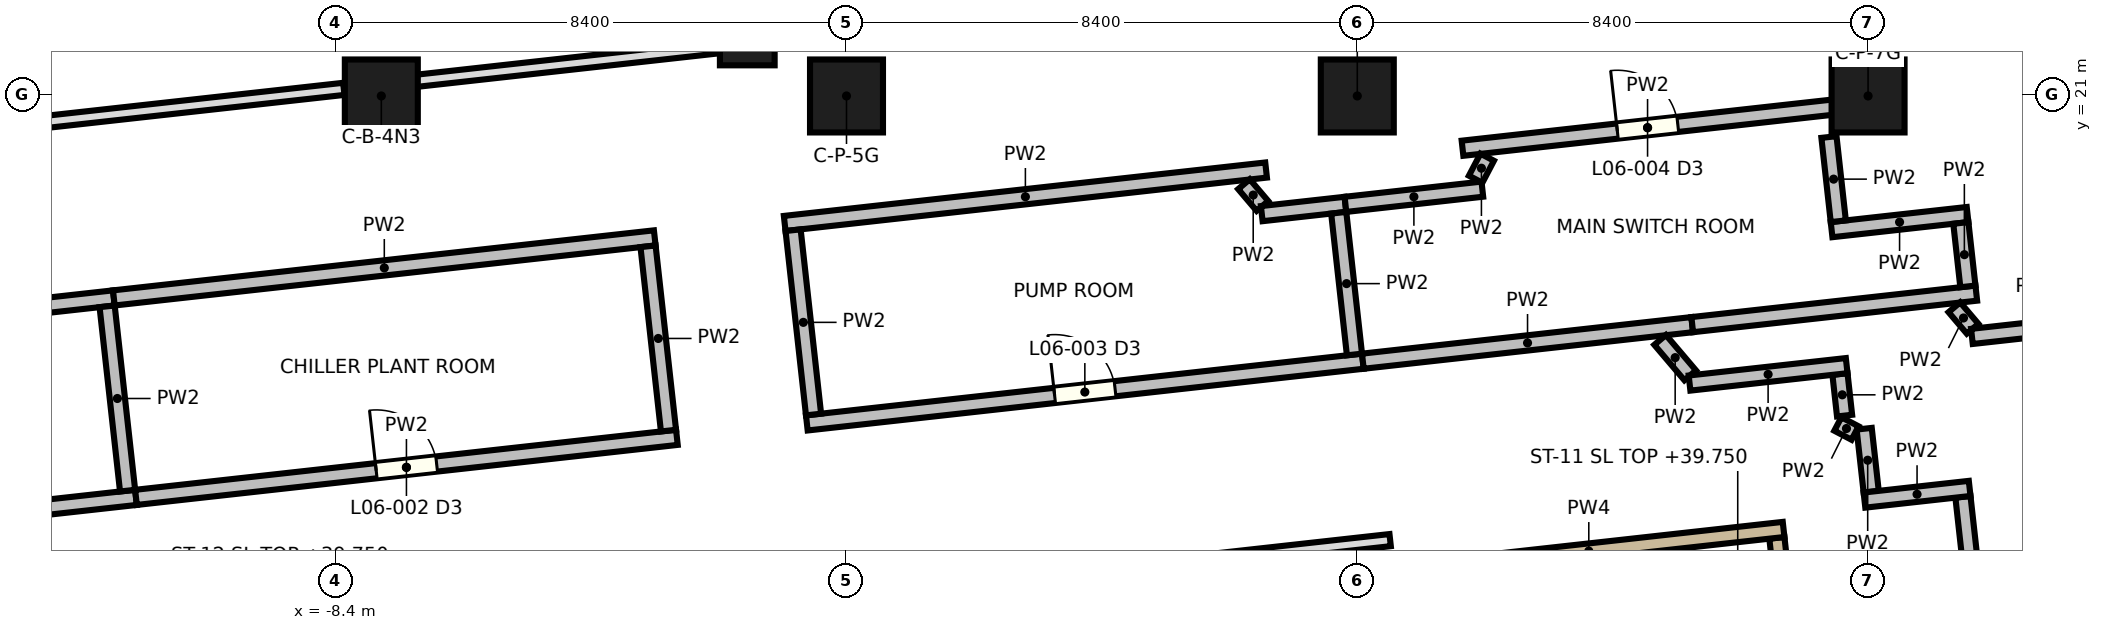
"""IFC4 building model, lengths in metres.
Left out: names, types, materials, properties, quantities, classifications, styles, units other than length and angle.
Written with IfcOpenShell. Run it as: python <this file> out.ifc"""

import sys

from ifc_helpers import new_model, si_unit, direction, frame, frame_2d, origin, origin_2d, place, context, subcontext, project, spatial, rectangle, extrude, element, fill, save


model = new_model("IFC4")
c1 = context("Model", 3, precision=1e-05, world=origin(), true_north=direction((0.0, 1.0)))
c2 = subcontext(c1, "Body", "Model", "MODEL_VIEW")
j1 = project(units=[si_unit("LENGTHUNIT", "METRE"), si_unit("PLANEANGLEUNIT", "RADIAN")], contexts=[c1])
p1 = place(None, origin())
s1 = spatial("IfcSite", under=j1, at=p1, CompositionType="ELEMENT")
p2 = place(p1, origin())
s2 = spatial("IfcBuilding", under=s1, at=p2, CompositionType="ELEMENT")
p3 = place(p2, frame((0.0, 0.0, 37.0)))
s3 = spatial("IfcBuildingStorey", under=s2, at=p3, CompositionType="ELEMENT", Elevation=37.0)
p4 = place(p3, frame((-1.632, 21.954, 0.0), z_axis=(0.0, 0.0, 1.0), x_axis=(1.0, 0.0, 0.0)))
e1 = element("IfcColumn", 1, at=p4, inside=s3, PredefinedType="COLUMN", context=c2, shape_type="SweptSolid", body=[
    extrude(rectangle(XDim=0.9, YDim=0.9, at=origin_2d()), origin(), (0.0, 0.0, 1.0), 4.3),
])
for number, where, z_axis, x_axis in (
    (2, (-7.65, 21.0, 0.0), (0.0, 0.0, 1.0), (1.0, 0.0, 0.0)),
    (3, (0.0, 21.0, 0.0), (0.0, 0.0, 1.0), (1.0, 0.0, 0.0)),
    (4, (8.4, 21.0, 0.0), (0.0, 0.0, 1.0), (1.0, 0.0, 0.0)),
    (5, (16.8, 21.0, 0.0), (0.0, 0.0, 1.0), (1.0, 0.0, 0.0)),
):
    element("IfcColumn", number, at=place(p3, frame(where, z_axis=z_axis, x_axis=x_axis)), inside=s3, PredefinedType="COLUMN", context=c2, shape_type="SweptSolid", body=[
        extrude(rectangle(XDim=1.2, YDim=1.2, at=origin_2d()), origin(), (0.0, 0.0, 1.0), 4.3),
    ])
p5 = place(p3, frame((-9.666, 11.631, 0.0), z_axis=(0.0, 0.0, 1.0), x_axis=(0.993896292658, 0.110318445605, 0.0)))
e6 = element("IfcWall", 6, at=p5, inside=s3, PredefinedType="PARTITIONING", context=c2, shape_type="SweptSolid", body=[
    extrude(rectangle(XDim=18.72, YDim=0.2, at=frame_2d((9.36, 0.0))), origin(), (0.0, 0.0, 1.0), 4.3),
])
p6 = place(p3, frame((-15.32, 13.995, 0.0), z_axis=(0.0, 0.0, 1.0), x_axis=(0.993893499596, 0.110343606342, 0.0)))
e7 = element("IfcWall", 7, at=p6, inside=s3, PredefinedType="PARTITIONING", context=c2, shape_type="SweptSolid", body=[
    extrude(rectangle(XDim=3.657, YDim=0.25, at=frame_2d((1.829, 0.0))), origin(), (0.0, 0.0, 1.0), 4.3),
])
p7 = place(p3, frame((-11.685, 14.399, 0.0), z_axis=(0.0, 0.0, 1.0), x_axis=(0.993897033744, 0.110311768703, 0.0)))
e8 = element("IfcWall", 8, at=p7, inside=s3, PredefinedType="PARTITIONING", context=c2, shape_type="SweptSolid", body=[
    extrude(rectangle(XDim=8.95, YDim=0.25, at=frame_2d((4.475, 0.0))), origin(), (0.0, 0.0, 1.0), 4.3),
])
p8 = place(p7, frame((3.975, 0.0, 0.0)))
e9 = element("IfcOpeningElement", 9, at=p8, cuts=e8, PredefinedType="OPENING", context=c2, shape_type="SweptSolid", body=[
    extrude(rectangle(XDim=1.0, YDim=2.1, at=frame_2d((0.5, 1.05))), frame((0.0, 0.135, 0.0), z_axis=(0.0, -1.0, 0.0), x_axis=(1.0, 0.0, 0.0)), (0.0, 0.0, 1.0), 0.27),
])
p9 = place(p3, frame((-0.652, 15.623, 0.0), z_axis=(0.0, 0.0, 1.0), x_axis=(0.993896672807, 0.110315020662, 0.0)))
e10 = element("IfcWall", 10, at=p9, inside=s3, PredefinedType="PARTITIONING", context=c2, shape_type="SweptSolid", body=[
    extrude(rectangle(XDim=9.2, YDim=0.25, at=frame_2d((4.6, 0.0))), origin(), (0.0, 0.0, 1.0), 4.3),
])
p10 = place(p9, frame((4.1, 0.0, 0.0)))
e11 = element("IfcOpeningElement", 11, at=p10, cuts=e10, PredefinedType="OPENING", context=c2, shape_type="SweptSolid", body=[
    extrude(rectangle(XDim=1.0, YDim=2.1, at=frame_2d((0.5, 1.05))), frame((0.0, 0.135, 0.0), z_axis=(0.0, -1.0, 0.0), x_axis=(1.0, 0.0, 0.0)), (0.0, 0.0, 1.0), 0.27),
])
p11 = place(p3, frame((8.491, 16.638, 0.0), z_axis=(0.0, 0.0, 1.0), x_axis=(0.993894655727, 0.110333192277, 0.0)))
e12 = element("IfcWall", 12, at=p11, inside=s3, PredefinedType="PARTITIONING", context=c2, shape_type="SweptSolid", body=[
    extrude(rectangle(XDim=5.45, YDim=0.25, at=frame_2d((2.725, 0.0))), origin(), (0.0, 0.0, 1.0), 4.3),
])
p12 = place(p3, frame((13.908, 17.24, 0.0), z_axis=(0.0, 0.0, 1.0), x_axis=(0.99390082634, 0.11027759247, 0.0)))
e13 = element("IfcWall", 13, at=p12, inside=s3, PredefinedType="PARTITIONING", context=c2, shape_type="SweptSolid", body=[
    extrude(rectangle(XDim=4.7, YDim=0.25, at=frame_2d((2.35, 0.0))), origin(), (0.0, 0.0, 1.0), 4.3),
])
p13 = place(p3, frame((16.2, 18.802, 0.0), z_axis=(0.0, 0.0, 1.0), x_axis=(0.99389299368, 0.110348163163, 0.0)))
e14 = element("IfcWall", 14, at=p13, inside=s3, PredefinedType="PARTITIONING", context=c2, shape_type="SweptSolid", body=[
    extrude(rectangle(XDim=2.25, YDim=0.25, at=frame_2d((1.125, 0.0))), origin(), (0.0, 0.0, 1.0), 4.3),
])
p14 = place(p3, frame((-20.397, 16.752, 0.0), z_axis=(0.0, 0.0, 1.0), x_axis=(0.993898612038, 0.110297547524, 0.0)))
e15 = element("IfcWall", 15, at=p14, inside=s3, PredefinedType="PARTITIONING", context=c2, shape_type="SweptSolid", body=[
    extrude(rectangle(XDim=8.4, YDim=0.25, at=frame_2d((4.2, 0.0))), origin(), (0.0, 0.0, 1.0), 4.3),
])
p15 = place(p14, frame((3.7, 0.0, 0.0)))
e16 = element("IfcOpeningElement", 16, at=p15, cuts=e15, PredefinedType="OPENING", context=c2, shape_type="SweptSolid", body=[
    extrude(rectangle(XDim=1.0, YDim=2.1, at=frame_2d((0.5, 1.05))), frame((0.0, 0.135, 0.0), z_axis=(0.0, -1.0, 0.0), x_axis=(1.0, 0.0, 0.0)), (0.0, 0.0, 1.0), 0.27),
])
p16 = place(p3, frame((-12.049, 17.679, 0.0), z_axis=(0.0, 0.0, 1.0), x_axis=(0.993896701795, 0.110314759491, 0.0)))
e17 = element("IfcWall", 17, at=p16, inside=s3, PredefinedType="PARTITIONING", context=c2, shape_type="SweptSolid", body=[
    extrude(rectangle(XDim=8.95, YDim=0.25, at=frame_2d((4.475, 0.0))), origin(), (0.0, 0.0, 1.0), 4.3),
])
p17 = place(p3, frame((-1.017, 18.903, 0.0), z_axis=(0.0, 0.0, 1.0), x_axis=(0.993897183523, 0.110310419203, 0.0)))
e18 = element("IfcWall", 18, at=p17, inside=s3, PredefinedType="PARTITIONING", context=c2, shape_type="SweptSolid", body=[
    extrude(rectangle(XDim=7.965, YDim=0.25, at=frame_2d((3.983, 0.0))), origin(), (0.0, 0.0, 1.0), 4.3),
])
p18 = place(p3, frame((10.13, 20.14, 0.0), z_axis=(0.0, 0.0, 1.0), x_axis=(0.993896854756, 0.110313381352, 0.0)))
e19 = element("IfcWall", 19, at=p18, inside=s3, PredefinedType="PARTITIONING", context=c2, shape_type="SweptSolid", body=[
    extrude(rectangle(XDim=6.124, YDim=0.25, at=frame_2d((3.062, 0.0))), origin(), (0.0, 0.0, 1.0), 4.3),
])
p19 = place(p18, frame((2.562, 0.0, 0.0)))
e20 = element("IfcOpeningElement", 20, at=p19, cuts=e19, PredefinedType="OPENING", context=c2, shape_type="SweptSolid", body=[
    extrude(rectangle(XDim=1.0, YDim=2.1, at=frame_2d((0.5, 1.05))), frame((0.0, 0.135, 0.0), z_axis=(0.0, -1.0, 0.0), x_axis=(1.0, 0.0, 0.0)), (0.0, 0.0, 1.0), 0.27),
])
p20 = place(p3, frame((-11.823, 14.51, 0.0), z_axis=(0.0, 0.0, 1.0), x_axis=(-0.110308521992, 0.993897394089, 0.0)))
e21 = element("IfcWall", 21, at=p20, inside=s3, PredefinedType="PARTITIONING", context=c2, shape_type="SweptSolid", body=[
    extrude(rectangle(XDim=3.05, YDim=0.25, at=frame_2d((1.525, 0.0))), origin(), (0.0, 0.0, 1.0), 4.3),
])
p21 = place(p3, frame((-2.927, 15.497, 0.0), z_axis=(0.0, 0.0, 1.0), x_axis=(-0.110378814906, 0.993889590055, 0.0)))
e22 = element("IfcWall", 22, at=p21, inside=s3, PredefinedType="PARTITIONING", context=c2, shape_type="SweptSolid", body=[
    extrude(rectangle(XDim=3.05, YDim=0.25, at=frame_2d((1.525, 0.0))), origin(), (0.0, 0.0, 1.0), 4.3),
])
p22 = place(p3, frame((6.84, 19.192, 0.0), z_axis=(0.0, 0.0, 1.0), x_axis=(-0.647179402506, 0.762337734192, 0.0)))
e23 = element("IfcWall", 23, at=p22, inside=s3, PredefinedType="PARTITIONING", context=c2, shape_type="SweptSolid", body=[
    extrude(rectangle(XDim=0.469, YDim=0.25, at=frame_2d((0.234, 0.0))), origin(), (0.0, 0.0, 1.0), 4.3),
])
p23 = place(p3, frame((6.829, 19.065, 0.0), z_axis=(0.0, 0.0, 1.0), x_axis=(0.993909510306, 0.110199298198, 0.0)))
e24 = element("IfcWall", 24, at=p23, inside=s3, PredefinedType="PARTITIONING", context=c2, shape_type="SweptSolid", body=[
    extrude(rectangle(XDim=1.385, YDim=0.25, at=frame_2d((0.692, 0.0))), origin(), (0.0, 0.0, 1.0), 4.3),
])
p24 = place(p3, frame((8.205, 19.218, 0.0), z_axis=(0.0, 0.0, 1.0), x_axis=(0.99389161804, 0.110360552686, 0.0)))
e25 = element("IfcWall", 25, at=p24, inside=s3, PredefinedType="PARTITIONING", context=c2, shape_type="SweptSolid", body=[
    extrude(rectangle(XDim=2.265, YDim=0.25, at=frame_2d((1.133, 0.0))), origin(), (0.0, 0.0, 1.0), 4.3),
])
p25 = place(p3, frame((8.354, 16.749, 0.0), z_axis=(0.0, 0.0, 1.0), x_axis=(-0.110351542432, 0.993892618487, 0.0)))
e26 = element("IfcWall", 26, at=p25, inside=s3, PredefinedType="PARTITIONING", context=c2, shape_type="SweptSolid", body=[
    extrude(rectangle(XDim=2.345, YDim=0.25, at=frame_2d((1.173, 0.0))), origin(), (0.0, 0.0, 1.0), 4.3),
])
p26 = place(p3, frame((-0.542, 15.761, 0.0), z_axis=(0.0, 0.0, 1.0), x_axis=(-0.110308521992, 0.993897394089, 0.0)))
e27 = element("IfcWall", 27, at=p26, inside=s3, PredefinedType="PARTITIONING", context=c2, shape_type="SweptSolid", body=[
    extrude(rectangle(XDim=3.05, YDim=0.25, at=frame_2d((1.525, 0.0))), origin(), (0.0, 0.0, 1.0), 4.3),
])
p27 = place(p3, frame((10.346, 19.631, 0.0), z_axis=(0.0, 0.0, 1.0), x_axis=(0.464341920083, 0.885656017455, 0.0)))
e28 = element("IfcWall", 28, at=p27, inside=s3, PredefinedType="PARTITIONING", context=c2, shape_type="SweptSolid", body=[
    extrude(rectangle(XDim=0.408, YDim=0.25, at=frame_2d((0.204, 0.0))), origin(), (0.0, 0.0, 1.0), 4.3),
])
p28 = place(p3, frame((16.31, 18.94, 0.0), z_axis=(0.0, 0.0, 1.0), x_axis=(-0.110354623568, 0.993892276385, 0.0)))
e29 = element("IfcWall", 29, at=p28, inside=s3, PredefinedType="PARTITIONING", context=c2, shape_type="SweptSolid", body=[
    extrude(rectangle(XDim=1.394, YDim=0.25, at=frame_2d((0.697, 0.0))), origin(), (0.0, 0.0, 1.0), 4.3),
])
p29 = place(p3, frame((18.519, 17.173, 0.0), z_axis=(0.0, 0.0, 1.0), x_axis=(-0.647571880012, 0.762004370209, 0.0)))
e30 = element("IfcWall", 30, at=p29, inside=s3, PredefinedType="PARTITIONING", context=c2, shape_type="SweptSolid", body=[
    extrude(rectangle(XDim=0.463, YDim=0.25, at=frame_2d((0.231, 0.0))), origin(), (0.0, 0.0, 1.0), 4.3),
])
p30 = place(p3, frame((18.441, 17.868, 0.0), z_axis=(0.0, 0.0, 1.0), x_axis=(-0.110201865026, 0.993909225707, 0.0)))
e31 = element("IfcWall", 31, at=p30, inside=s3, PredefinedType="PARTITIONING", context=c2, shape_type="SweptSolid", body=[
    extrude(rectangle(XDim=1.05, YDim=0.25, at=frame_2d((0.525, 0.0))), origin(), (0.0, 0.0, 1.0), 4.3),
])
p31 = place(p3, frame((13.875, 16.406, 0.0), z_axis=(0.0, 0.0, 1.0), x_axis=(-0.647444419419, 0.762112671305, 0.0)))
e32 = element("IfcWall", 32, at=p31, inside=s3, PredefinedType="PARTITIONING", context=c2, shape_type="SweptSolid", body=[
    extrude(rectangle(XDim=0.764, YDim=0.25, at=frame_2d((0.382, 0.0))), origin(), (0.0, 0.0, 1.0), 4.3),
])
p32 = place(p3, frame((16.851, 14.492, 0.0), z_axis=(0.0, 0.0, 1.0), x_axis=(-0.110354378825, 0.993892303559, 0.0)))
e33 = element("IfcWall", 33, at=p32, inside=s3, PredefinedType="PARTITIONING", context=c2, shape_type="SweptSolid", body=[
    extrude(rectangle(XDim=1.042, YDim=0.25, at=frame_2d((0.521, 0.0))), origin(), (0.0, 0.0, 1.0), 4.3),
])
p33 = place(p3, frame((18.719, 11.178, 0.0), z_axis=(0.0, 0.0, 1.0), x_axis=(-0.110274873847, 0.993901127979, 0.0)))
e34 = element("IfcWall", 34, at=p33, inside=s3, PredefinedType="PARTITIONING", context=c2, shape_type="SweptSolid", body=[
    extrude(rectangle(XDim=3.25, YDim=0.25, at=frame_2d((1.625, 0.0))), origin(), (0.0, 0.0, 1.0), 4.3),
])
p34 = place(p3, frame((16.74, 14.354, 0.0), z_axis=(0.0, 0.0, 1.0), x_axis=(0.99390424381, 0.110246787417, 0.0)))
e35 = element("IfcWall", 35, at=p34, inside=s3, PredefinedType="PARTITIONING", context=c2, shape_type="SweptSolid", body=[
    extrude(rectangle(XDim=1.74, YDim=0.25, at=frame_2d((0.87, 0.0))), origin(), (0.0, 0.0, 1.0), 4.3),
])
p35 = place(p3, frame((16.303, 15.605, 0.0), z_axis=(0.0, 0.0, 1.0), x_axis=(0.885711947261, -0.46423522753, 0.0)))
e36 = element("IfcWall", 36, at=p35, inside=s3, PredefinedType="PARTITIONING", context=c2, shape_type="SweptSolid", body=[
    extrude(rectangle(XDim=0.32, YDim=0.25, at=frame_2d((0.16, 0.0))), origin(), (0.0, 0.0, 1.0), 4.3),
])
p36 = place(p3, frame((16.414, 15.743, 0.0), z_axis=(0.0, 0.0, 1.0), x_axis=(-0.11031473064, 0.993896704997, 0.0)))
e37 = element("IfcWall", 37, at=p36, inside=s3, PredefinedType="PARTITIONING", context=c2, shape_type="SweptSolid", body=[
    extrude(rectangle(XDim=0.688, YDim=0.25, at=frame_2d((0.344, 0.0))), origin(), (0.0, 0.0, 1.0), 4.3),
])
p37 = place(p3, frame((13.864, 16.279, 0.0), z_axis=(0.0, 0.0, 1.0), x_axis=(0.993904330938, 0.110246001939, 0.0)))
e38 = element("IfcWall", 38, at=p37, inside=s3, PredefinedType="PARTITIONING", context=c2, shape_type="SweptSolid", body=[
    extrude(rectangle(XDim=2.6, YDim=0.25, at=frame_2d((1.3, 0.0))), origin(), (0.0, 0.0, 1.0), 4.3),
])
p38 = place(p3, frame((18.508, 17.046, 0.0), z_axis=(0.0, 0.0, 1.0), x_axis=(0.993903105943, 0.110257045113, 0.0)))
e39 = element("IfcWall", 39, at=p38, inside=s3, PredefinedType="PARTITIONING", context=c2, shape_type="SweptSolid", body=[
    extrude(rectangle(XDim=2.15, YDim=0.25, at=frame_2d((1.075, 0.0))), origin(), (0.0, 0.0, 1.0), 4.3),
])
p39 = place(p3, frame((-23.685, 19.406, 0.0), z_axis=(0.0, 0.0, 1.0), x_axis=(0.993897928533, 0.110303706454, 0.0)))
e40 = element("IfcWall", 40, at=p39, inside=s3, PredefinedType="PARTITIONING", context=c2, shape_type="SweptSolid", body=[
    extrude(rectangle(XDim=15.513, YDim=0.2, at=frame_2d((7.757, 0.0))), origin(), (0.0, 0.0, 1.0), 4.3),
])
p40 = place(p3, frame((-7.074, 21.249, 0.0), z_axis=(0.0, 0.0, 1.0), x_axis=(0.993896966833, 0.110312371567, 0.0)))
e41 = element("IfcWall", 41, at=p40, inside=s3, PredefinedType="PARTITIONING", context=c2, shape_type="SweptSolid", body=[
    extrude(rectangle(XDim=26.087, YDim=0.2, at=frame_2d((13.043, 0.0))), origin(), (0.0, 0.0, 1.0), 4.3),
])
p41 = place(p3, frame((15.3, 13.733, 0.0), z_axis=(0.0, 0.0, 1.0), x_axis=(0.110252878147, -0.99390356819, 0.0)))
e42 = element("IfcWall", 42, at=p41, inside=s3, PredefinedType="SOLIDWALL", context=c2, shape_type="SweptSolid", body=[
    extrude(rectangle(XDim=2.85, YDim=0.25, at=frame_2d((1.425, 0.0))), origin(), (0.0, 0.0, 1.0), 4.3),
])
p42 = place(p3, frame((9.004, 13.16, 0.0), z_axis=(0.0, 0.0, 1.0), x_axis=(0.993895737244, 0.1103234494, 0.0)))
e43 = element("IfcWall", 43, at=p42, inside=s3, PredefinedType="SOLIDWALL", context=c2, shape_type="SweptSolid", body=[
    extrude(rectangle(XDim=6.446, YDim=0.25, at=frame_2d((3.223, 0.0))), origin(), (0.0, 0.0, 1.0), 4.3),
])
p43 = place(p8, origin())
e44 = element("IfcDoor", 44, at=p43, inside=s3, PredefinedType="DOOR", context=c2, shape_type="SweptSolid", body=[
    extrude(rectangle(XDim=1.0, YDim=2.1, at=frame_2d((0.5, 1.05))), frame((0.0, 0.025, 0.0), z_axis=(0.0, -1.0, 0.0), x_axis=(1.0, 0.0, 0.0)), (0.0, 0.0, 1.0), 0.05),
])
fill(e9, e44)
p44 = place(p10, origin())
e45 = element("IfcDoor", 45, at=p44, inside=s3, PredefinedType="DOOR", context=c2, shape_type="SweptSolid", body=[
    extrude(rectangle(XDim=1.0, YDim=2.1, at=frame_2d((0.5, 1.05))), frame((0.0, 0.025, 0.0), z_axis=(0.0, -1.0, 0.0), x_axis=(1.0, 0.0, 0.0)), (0.0, 0.0, 1.0), 0.05),
])
fill(e11, e45)
p45 = place(p19, origin())
e46 = element("IfcDoor", 46, at=p45, inside=s3, PredefinedType="DOOR", context=c2, shape_type="SweptSolid", body=[
    extrude(rectangle(XDim=1.0, YDim=2.1, at=frame_2d((0.5, 1.05))), frame((0.0, 0.025, 0.0), z_axis=(0.0, -1.0, 0.0), x_axis=(1.0, 0.0, 0.0)), (0.0, 0.0, 1.0), 0.05),
])
fill(e20, e46)
save(model, sys.argv[1])
